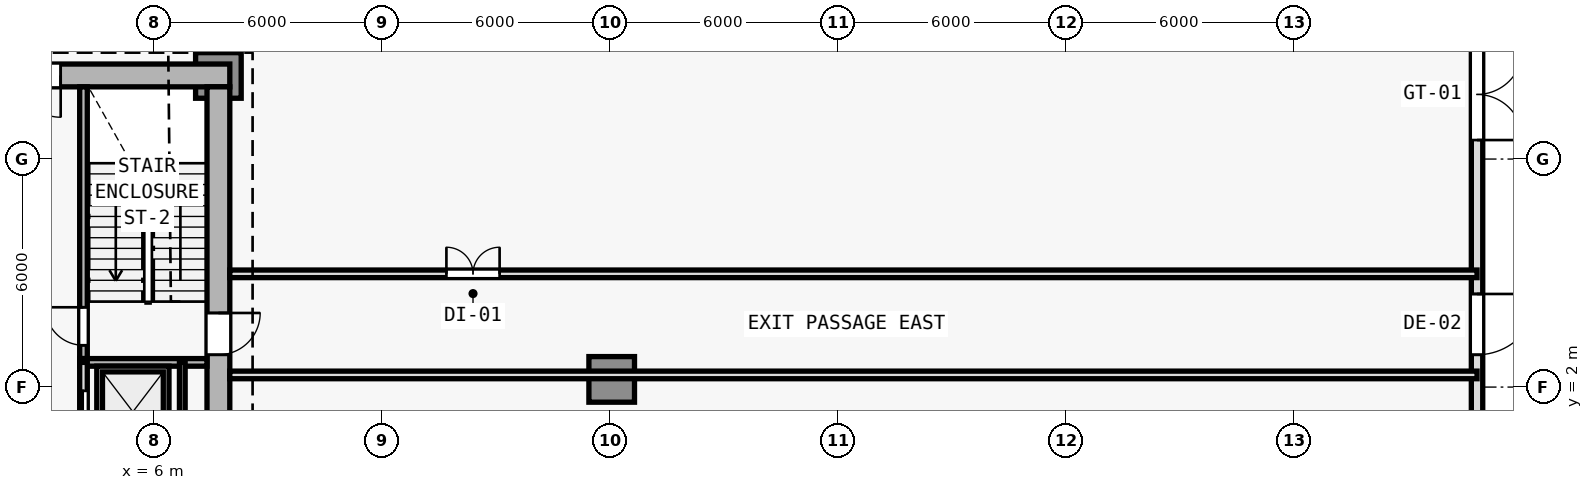
"""IFC4 building model, lengths in metres.
Left out: names, types, materials, properties, quantities, classifications, styles, units other than length and angle.
Written with IfcOpenShell. Run it as: python <this file> out.ifc"""

import sys

from ifc_helpers import new_model, si_unit, direction, frame, frame_2d, origin, origin_2d, place, context, subcontext, project, spatial, rectangle, extrude, element, fill, save


model = new_model("IFC4")
c1 = context("Model", 3, precision=1e-05, world=origin(), true_north=direction((0.0, 1.0)))
c2 = subcontext(c1, "Body", "Model", "MODEL_VIEW")
j1 = project(units=[si_unit("LENGTHUNIT", "METRE"), si_unit("PLANEANGLEUNIT", "RADIAN")], contexts=[c1])
p1 = place(None, origin())
s1 = spatial("IfcSite", under=j1, at=p1, CompositionType="ELEMENT")
p2 = place(p1, origin())
s2 = spatial("IfcBuilding", under=s1, at=p2, CompositionType="ELEMENT")
p3 = place(p2, origin())
s3 = spatial("IfcBuildingStorey", under=s2, at=p3, CompositionType="ELEMENT", Elevation=0.0)
for number, where, z_axis, x_axis in (
    (1, (7.7, 10.2, 0.0), (0.0, 0.0, 1.0), (1.0, 0.0, 0.0)),
    (2, (18.05, 2.202, 0.0), (0.0, 0.0, 1.0), (1.0, 0.0, 0.0)),
):
    element("IfcColumn", number, at=place(p3, frame(where, z_axis=z_axis, x_axis=x_axis)), inside=s3, PredefinedType="COLUMN", context=c2, shape_type="SweptSolid", body=[
        extrude(rectangle(XDim=1.2, YDim=1.2, at=origin_2d()), origin(), (0.0, 0.0, 1.0), 5.0),
    ])
p4 = place(p3, frame((40.82, 18.1, 0.0), z_axis=(0.0, 0.0, 1.0), x_axis=(0.0, -1.0, 0.0)))
e3 = element("IfcWall", 3, at=p4, inside=s3, PredefinedType="SOLIDWALL", context=c2, shape_type="SweptSolid", body=[
    extrude(rectangle(XDim=39.8, YDim=0.3, at=frame_2d((19.9, 0.0))), origin(), (0.0, 0.0, 1.0), 4.72),
])
p5 = place(p4, frame((25.2, 0.0, 0.0)))
e4 = element("IfcOpeningElement", 4, at=p5, cuts=e3, PredefinedType="OPENING", context=c2, shape_type="SweptSolid", body=[
    extrude(rectangle(XDim=2.4, YDim=2.4, at=frame_2d((1.2, 1.2))), frame((0.0, 0.16, 0.0), z_axis=(0.0, -1.0, 0.0), x_axis=(1.0, 0.0, 0.0)), (0.0, 0.0, 1.0), 0.32),
])
p6 = place(p4, frame((13.65, 0.0, 0.0)))
e5 = element("IfcOpeningElement", 5, at=p6, cuts=e3, PredefinedType="OPENING", context=c2, shape_type="SweptSolid", body=[
    extrude(rectangle(XDim=1.6, YDim=2.3, at=frame_2d((0.8, 1.15))), frame((0.0, 0.16, 0.0), z_axis=(0.0, -1.0, 0.0), x_axis=(1.0, 0.0, 0.0)), (0.0, 0.0, 1.0), 0.32),
])
p7 = place(p4, frame((7.2, 0.0, 0.0)))
e6 = element("IfcOpeningElement", 6, at=p7, cuts=e3, PredefinedType="OPENING", context=c2, shape_type="SweptSolid", body=[
    extrude(rectangle(XDim=2.4, YDim=2.4, at=frame_2d((1.2, 1.2))), frame((0.0, 0.16, 0.0), z_axis=(0.0, -1.0, 0.0), x_axis=(1.0, 0.0, 0.0)), (0.0, 0.0, 1.0), 0.32),
])
p8 = place(p3, frame((8.0, 10.2, 0.0), z_axis=(0.0, 0.0, 1.0), x_axis=(-1.0, 0.0, 0.0)))
e7 = element("IfcWall", 7, at=p8, inside=s3, PredefinedType="SHEAR", context=c2, shape_type="SweptSolid", body=[
    extrude(rectangle(XDim=16.0, YDim=0.6, at=frame_2d((8.0, 0.0))), origin(), (0.0, 0.0, 1.0), 4.72),
])
p9 = place(p8, frame((4.45, 0.0, 0.0)))
e8 = element("IfcOpeningElement", 8, at=p9, cuts=e7, PredefinedType="OPENING", context=c2, shape_type="SweptSolid", body=[
    extrude(rectangle(XDim=1.1, YDim=2.15, at=frame_2d((0.55, 1.075))), frame((0.0, 0.31, 0.0), z_axis=(0.0, -1.0, 0.0), x_axis=(1.0, 0.0, 0.0)), (0.0, 0.0, 1.0), 0.62),
])
p10 = place(p3, frame((7.7, 9.9, 0.0), z_axis=(0.0, 0.0, 1.0), x_axis=(0.0, -1.0, 0.0)))
e9 = element("IfcWall", 9, at=p10, inside=s3, PredefinedType="SHEAR", context=c2, shape_type="SweptSolid", body=[
    extrude(rectangle(XDim=19.0, YDim=0.6, at=frame_2d((9.5, 0.0))), origin(), (0.0, 0.0, 1.0), 4.72),
])
p11 = place(p10, frame((5.95, 0.0, 0.0)))
e10 = element("IfcOpeningElement", 10, at=p11, cuts=e9, PredefinedType="OPENING", context=c2, shape_type="SweptSolid", body=[
    extrude(rectangle(XDim=1.1, YDim=2.15, at=frame_2d((0.55, 1.075))), frame((0.0, 0.31, 0.0), z_axis=(0.0, -1.0, 0.0), x_axis=(1.0, 0.0, 0.0)), (0.0, 0.0, 1.0), 0.62),
])
p12 = place(p3, frame((4.15, 2.75, 0.0), z_axis=(0.0, 0.0, 1.0), x_axis=(0.0, 1.0, 0.0)))
e11 = element("IfcWall", 11, at=p12, inside=s3, PredefinedType="SOLIDWALL", context=c2, shape_type="SweptSolid", body=[
    extrude(rectangle(XDim=7.15, YDim=0.2, at=frame_2d((3.575, 0.0))), origin(), (0.0, 0.0, 1.0), 4.72),
])
p13 = place(p12, frame((0.35, 0.0, 0.0)))
e12 = element("IfcOpeningElement", 12, at=p13, cuts=e11, PredefinedType="OPENING", context=c2, shape_type="SweptSolid", body=[
    extrude(rectangle(XDim=1.0, YDim=2.15, at=frame_2d((0.5, 1.075))), frame((0.0, 0.11, 0.0), z_axis=(0.0, -1.0, 0.0), x_axis=(1.0, 0.0, 0.0)), (0.0, 0.0, 1.0), 0.22),
])
p14 = place(p3, frame((4.05, 2.65, 0.0), z_axis=(0.0, 0.0, 1.0), x_axis=(1.0, 0.0, 0.0)))
e13 = element("IfcWall", 13, at=p14, inside=s3, PredefinedType="SOLIDWALL", context=c2, shape_type="SweptSolid", body=[
    extrude(rectangle(XDim=3.35, YDim=0.2, at=frame_2d((1.675, 0.0))), origin(), (0.0, 0.0, 1.0), 4.72),
])
p15 = place(p3, frame((4.15, -6.05, 0.0), z_axis=(0.0, 0.0, 1.0), x_axis=(0.0, 1.0, 0.0)))
e14 = element("IfcWall", 14, at=p15, inside=s3, PredefinedType="SOLIDWALL", context=c2, shape_type="SweptSolid", body=[
    extrude(rectangle(XDim=8.7, YDim=0.2, at=frame_2d((4.35, 0.0))), origin(), (0.0, 0.0, 1.0), 4.72),
])
p16 = place(p15, frame((0.55, 0.0, 0.0)))
e15 = element("IfcOpeningElement", 15, at=p16, cuts=e14, PredefinedType="OPENING", context=c2, shape_type="SweptSolid", body=[
    extrude(rectangle(XDim=1.1, YDim=2.15, at=frame_2d((0.55, 1.075))), frame((0.0, 0.11, 0.0), z_axis=(0.0, -1.0, 0.0), x_axis=(1.0, 0.0, 0.0)), (0.0, 0.0, 1.0), 0.22),
])
p17 = place(p15, frame((2.65, 0.0, 0.0)))
e16 = element("IfcOpeningElement", 16, at=p17, cuts=e14, PredefinedType="OPENING", context=c2, shape_type="SweptSolid", body=[
    extrude(rectangle(XDim=1.1, YDim=2.15, at=frame_2d((0.55, 1.075))), frame((0.0, 0.11, 0.0), z_axis=(0.0, -1.0, 0.0), x_axis=(1.0, 0.0, 0.0)), (0.0, 0.0, 1.0), 0.22),
])
p18 = place(p15, frame((4.75, 0.0, 0.0)))
e17 = element("IfcOpeningElement", 17, at=p18, cuts=e14, PredefinedType="OPENING", context=c2, shape_type="SweptSolid", body=[
    extrude(rectangle(XDim=1.1, YDim=2.15, at=frame_2d((0.55, 1.075))), frame((0.0, 0.11, 0.0), z_axis=(0.0, -1.0, 0.0), x_axis=(1.0, 0.0, 0.0)), (0.0, 0.0, 1.0), 0.22),
])
p19 = place(p15, frame((6.85, 0.0, 0.0)))
e18 = element("IfcOpeningElement", 18, at=p19, cuts=e14, PredefinedType="OPENING", context=c2, shape_type="SweptSolid", body=[
    extrude(rectangle(XDim=1.1, YDim=2.15, at=frame_2d((0.55, 1.075))), frame((0.0, 0.11, 0.0), z_axis=(0.0, -1.0, 0.0), x_axis=(1.0, 0.0, 0.0)), (0.0, 0.0, 1.0), 0.22),
])
p20 = place(p3, frame((6.75, -6.05, 0.0), z_axis=(0.0, 0.0, 1.0), x_axis=(0.0, 1.0, 0.0)))
e19 = element("IfcWall", 19, at=p20, inside=s3, PredefinedType="PARTITIONING", context=c2, shape_type="SweptSolid", body=[
    extrude(rectangle(XDim=8.7, YDim=0.15, at=frame_2d((4.35, 0.0))), origin(), (0.0, 0.0, 1.0), 4.72),
])
p21 = place(p3, frame((8.0, 2.32, 0.0), z_axis=(0.0, 0.0, 1.0), x_axis=(1.0, 0.0, 0.0)))
e20 = element("IfcWall", 20, at=p21, inside=s3, PredefinedType="SOLIDWALL", context=c2, shape_type="SweptSolid", body=[
    extrude(rectangle(XDim=32.82, YDim=0.2, at=frame_2d((16.41, 0.0))), origin(), (0.0, 0.0, 1.0), 3.881),
])
p22 = place(p3, frame((8.0, 4.98, 0.0), z_axis=(0.0, 0.0, 1.0), x_axis=(1.0, 0.0, 0.0)))
e21 = element("IfcWall", 21, at=p22, inside=s3, PredefinedType="SOLIDWALL", context=c2, shape_type="SweptSolid", body=[
    extrude(rectangle(XDim=32.82, YDim=0.2, at=frame_2d((16.41, 0.0))), origin(), (0.0, 0.0, 1.0), 4.105),
])
p23 = place(p22, frame((5.7, 0.0, 0.0)))
e22 = element("IfcOpeningElement", 22, at=p23, cuts=e21, PredefinedType="OPENING", context=c2, shape_type="SweptSolid", body=[
    extrude(rectangle(XDim=1.4, YDim=2.2, at=frame_2d((0.7, 1.1))), frame((0.0, 0.11, 0.0), z_axis=(0.0, -1.0, 0.0), x_axis=(1.0, 0.0, 0.0)), (0.0, 0.0, 1.0), 0.22),
])
p24 = place(p6, origin())
e23 = element("IfcDoor", 23, at=p24, inside=s3, OperationType="SINGLE_SWING_LEFT", PredefinedType="DOOR", context=c2, shape_type="SweptSolid", body=[
    extrude(rectangle(XDim=1.6, YDim=2.3, at=frame_2d((0.8, 1.15))), frame((0.0, 0.025, 0.0), z_axis=(0.0, -1.0, 0.0), x_axis=(1.0, 0.0, 0.0)), (0.0, 0.0, 1.0), 0.05),
])
fill(e5, e23)
p25 = place(p7, origin())
e24 = element("IfcDoor", 24, at=p25, inside=s3, OperationType="DOUBLE_DOOR_SINGLE_SWING", PredefinedType="GATE", context=c2, shape_type="SweptSolid", body=[
    extrude(rectangle(XDim=2.4, YDim=2.4, at=frame_2d((1.2, 1.2))), frame((0.0, 0.025, 0.0), z_axis=(0.0, -1.0, 0.0), x_axis=(1.0, 0.0, 0.0)), (0.0, 0.0, 1.0), 0.05),
])
fill(e6, e24)
p26 = place(p9, origin())
e25 = element("IfcDoor", 25, at=p26, inside=s3, OperationType="SINGLE_SWING_LEFT", PredefinedType="DOOR", context=c2, shape_type="SweptSolid", body=[
    extrude(rectangle(XDim=1.1, YDim=2.15, at=frame_2d((0.55, 1.075))), frame((0.0, 0.025, 0.0), z_axis=(0.0, -1.0, 0.0), x_axis=(1.0, 0.0, 0.0)), (0.0, 0.0, 1.0), 0.05),
])
fill(e8, e25)
p27 = place(p11, origin())
e26 = element("IfcDoor", 26, at=p27, inside=s3, OperationType="SINGLE_SWING_LEFT", PredefinedType="DOOR", context=c2, shape_type="SweptSolid", body=[
    extrude(rectangle(XDim=1.1, YDim=2.15, at=frame_2d((0.55, 1.075))), frame((0.0, 0.025, 0.0), z_axis=(0.0, -1.0, 0.0), x_axis=(1.0, 0.0, 0.0)), (0.0, 0.0, 1.0), 0.05),
])
fill(e10, e26)
p28 = place(p13, origin())
e27 = element("IfcDoor", 27, at=p28, inside=s3, OperationType="SINGLE_SWING_RIGHT", PredefinedType="DOOR", context=c2, shape_type="SweptSolid", body=[
    extrude(rectangle(XDim=1.0, YDim=2.15, at=frame_2d((0.5, 1.075))), frame((0.0, 0.025, 0.0), z_axis=(0.0, -1.0, 0.0), x_axis=(1.0, 0.0, 0.0)), (0.0, 0.0, 1.0), 0.05),
])
fill(e12, e27)
p29 = place(p19, origin())
e28 = element("IfcDoor", 28, at=p29, inside=s3, OperationType="DOUBLE_DOOR_SLIDING", PredefinedType="DOOR", context=c2, shape_type="SweptSolid", body=[
    extrude(rectangle(XDim=1.1, YDim=2.15, at=frame_2d((0.55, 1.075))), frame((0.0, 0.025, 0.0), z_axis=(0.0, -1.0, 0.0), x_axis=(1.0, 0.0, 0.0)), (0.0, 0.0, 1.0), 0.05),
])
fill(e18, e28)
p30 = place(p23, origin())
e29 = element("IfcDoor", 29, at=p30, inside=s3, OperationType="DOUBLE_DOOR_SINGLE_SWING", PredefinedType="DOOR", context=c2, shape_type="SweptSolid", body=[
    extrude(rectangle(XDim=1.4, YDim=2.2, at=frame_2d((0.7, 1.1))), frame((0.0, 0.025, 0.0), z_axis=(0.0, -1.0, 0.0), x_axis=(1.0, 0.0, 0.0)), (0.0, 0.0, 1.0), 0.05),
])
fill(e22, e29)
save(model, sys.argv[1])
